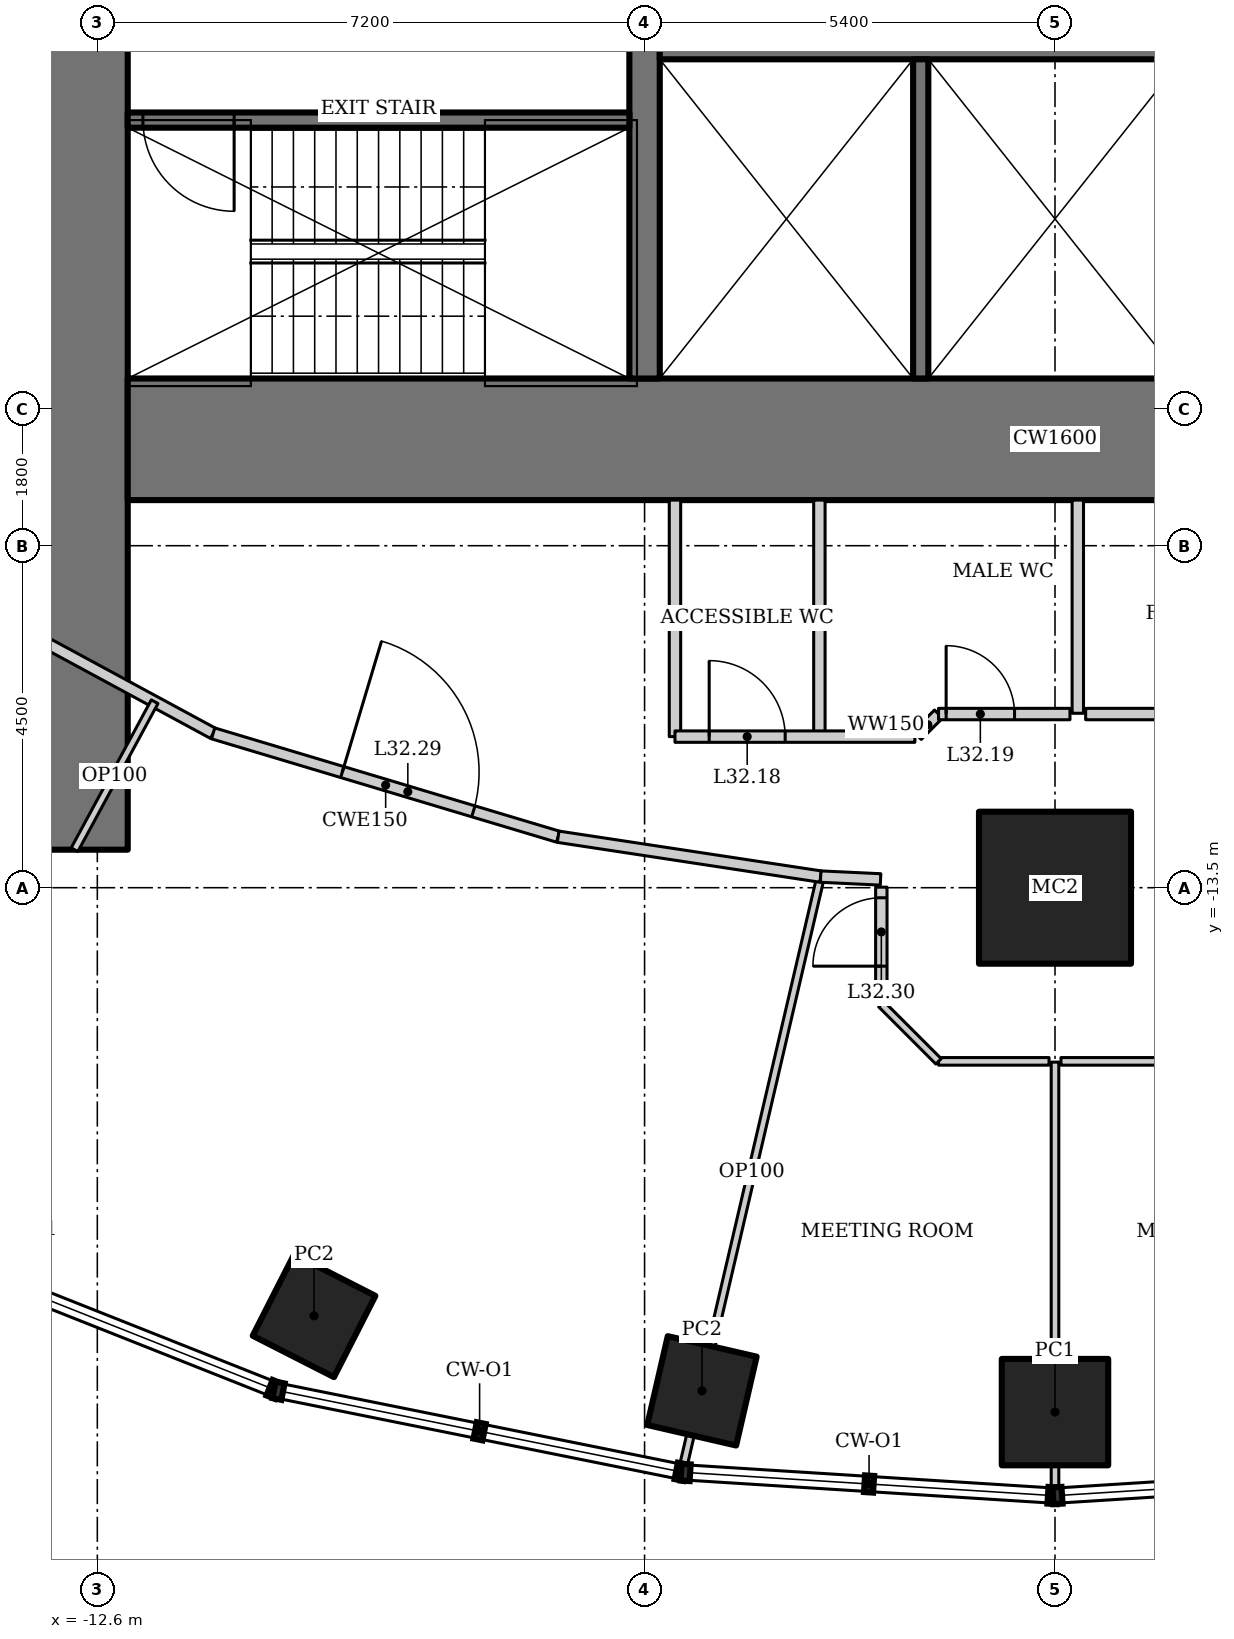
"""IFC4 building model, lengths in metres.
Left out: names, types, materials, properties, quantities, classifications, styles, units other than length and angle.
Written with IfcOpenShell. Run it as: python <this file> out.ifc"""

import sys

from ifc_helpers import new_model, si_unit, direction, frame, frame_2d, origin, origin_2d, place, context, subcontext, project, spatial, rectangle, hollow_rectangle, extrude, element, fill, save


model = new_model("IFC4")
c1 = context("Model", 3, precision=1e-05, world=origin(), true_north=direction((0.0, 1.0)))
c2 = subcontext(c1, "Body", "Model", "MODEL_VIEW")
j1 = project(units=[si_unit("LENGTHUNIT", "METRE"), si_unit("PLANEANGLEUNIT", "RADIAN")], contexts=[c1])
p1 = place(None, origin())
s1 = spatial("IfcSite", under=j1, at=p1, CompositionType="ELEMENT")
p2 = place(p1, origin())
s2 = spatial("IfcBuilding", under=s1, at=p2, CompositionType="ELEMENT")
p3 = place(p2, frame((0.0, 0.0, 138.4)))
s3 = spatial("IfcBuildingStorey", under=s2, at=p3, CompositionType="ELEMENT", Elevation=138.4)
p4 = place(p3, frame((0.0, -13.5, 0.0), z_axis=(0.0, 0.0, 1.0), x_axis=(1.0, 0.0, 0.0)))
e1 = element("IfcColumn", 1, at=p4, inside=s3, PredefinedType="COLUMN", context=c2, shape_type="SweptSolid", body=[
    extrude(hollow_rectangle(XDim=2.0, YDim=2.0, WallThickness=0.17, at=origin_2d()), origin(), (0.0, 0.0, 1.0), 4.2),
])
for number, where, z_axis, x_axis in (
    (2, (-9.749, -19.133, 0.0), (0.0, 0.0, 1.0), (0.454, 0.891, 0.0)),
    (3, (-4.645, -20.12, 0.0), (0.0, 0.0, 1.0), (0.225, 0.974, 0.0)),
):
    element("IfcColumn", number, at=place(p3, frame(where, z_axis=z_axis, x_axis=x_axis)), inside=s3, PredefinedType="COLUMN", context=c2, shape_type="SweptSolid", body=[
        extrude(hollow_rectangle(XDim=1.2, YDim=1.2, WallThickness=0.1, at=origin_2d()), origin(), (0.0, 0.0, 1.0), 4.2),
    ])
p5 = place(p3, frame((0.0, -20.4, 0.0), z_axis=(0.0, 0.0, 1.0), x_axis=(1.0, 0.0, 0.0)))
e4 = element("IfcColumn", 4, at=p5, inside=s3, PredefinedType="COLUMN", context=c2, shape_type="SweptSolid", body=[
    extrude(hollow_rectangle(XDim=1.4, YDim=1.4, WallThickness=0.1, at=origin_2d()), origin(), (0.0, 0.0, 1.0), 4.2),
])
p6 = place(p3, frame((-12.9, 13.0, 0.0), z_axis=(0.0, 0.0, 1.0), x_axis=(0.0, -1.0, 0.0)))
e5 = element("IfcWall", 5, at=p6, inside=s3, PredefinedType="SHEAR", context=c2, shape_type="SweptSolid", body=[
    extrude(rectangle(XDim=26.0, YDim=1.4, at=frame_2d((13.0, 0.0))), origin(), (0.0, 0.0, 1.0), 4.2),
])
p7 = place(p6, frame((12.1, 0.0, 0.0)))
e6 = element("IfcOpeningElement", 6, at=p7, cuts=e5, PredefinedType="OPENING", context=c2, shape_type="SweptSolid", body=[
    extrude(rectangle(XDim=1.8, YDim=2.1, at=frame_2d((0.9, 1.05))), frame((0.0, 0.71, 0.0), z_axis=(0.0, -1.0, 0.0), x_axis=(1.0, 0.0, 0.0)), (0.0, 0.0, 1.0), 1.42),
])
p8 = place(p3, frame((-12.2, -7.6, 0.0), z_axis=(0.0, 0.0, 1.0), x_axis=(1.0, 0.0, 0.0)))
e7 = element("IfcWall", 7, at=p8, inside=s3, PredefinedType="SHEAR", context=c2, shape_type="SweptSolid", body=[
    extrude(rectangle(XDim=24.4, YDim=1.6, at=frame_2d((12.2, 0.0))), origin(), (0.0, 0.0, 1.0), 4.2),
])
p9 = place(p3, frame((-5.4, 6.8, 0.0), z_axis=(0.0, 0.0, 1.0), x_axis=(0.0, -1.0, 0.0)))
e8 = element("IfcWall", 8, at=p9, inside=s3, PredefinedType="SHEAR", context=c2, shape_type="SweptSolid", body=[
    extrude(rectangle(XDim=13.6, YDim=0.4, at=frame_2d((6.8, 0.0))), origin(), (0.0, 0.0, 1.0), 4.2),
])
p10 = place(p9, frame((5.9, 0.0, 0.0)))
e9 = element("IfcOpeningElement", 9, at=p10, cuts=e8, PredefinedType="OPENING", context=c2, shape_type="SweptSolid", body=[
    extrude(rectangle(XDim=1.8, YDim=2.1, at=frame_2d((0.9, 1.05))), frame((0.0, 0.21, 0.0), z_axis=(0.0, -1.0, 0.0), x_axis=(1.0, 0.0, 0.0)), (0.0, 0.0, 1.0), 0.42),
])
p11 = place(p3, frame((-5.2, -2.4, 0.0), z_axis=(0.0, 0.0, 1.0), x_axis=(1.0, 0.0, 0.0)))
e10 = element("IfcWall", 10, at=p11, inside=s3, PredefinedType="SHEAR", context=c2, shape_type="SweptSolid", body=[
    extrude(rectangle(XDim=10.4, YDim=0.4, at=frame_2d((5.2, 0.0))), origin(), (0.0, 0.0, 1.0), 4.2),
])
p12 = place(p3, frame((-1.767, -2.6, 0.0), z_axis=(0.0, 0.0, 1.0), x_axis=(0.0, -1.0, 0.0)))
e11 = element("IfcWall", 11, at=p12, inside=s3, PredefinedType="SOLIDWALL", context=c2, shape_type="SweptSolid", body=[
    extrude(rectangle(XDim=4.2, YDim=0.2, at=frame_2d((2.1, 0.0))), origin(), (0.0, 0.0, 1.0), 4.2),
])
p13 = place(p3, frame((-5.6, -3.4, 0.0), z_axis=(0.0, 0.0, 1.0), x_axis=(-1.0, 0.0, 0.0)))
e12 = element("IfcWall", 12, at=p13, inside=s3, PredefinedType="SHEAR", context=c2, shape_type="SweptSolid", body=[
    extrude(rectangle(XDim=6.6, YDim=0.2, at=frame_2d((3.3, 0.0))), origin(), (0.0, 0.0, 1.0), 4.2),
])
p14 = place(p13, frame((5.2, 0.0, 0.0)))
e13 = element("IfcOpeningElement", 13, at=p14, cuts=e12, PredefinedType="OPENING", context=c2, shape_type="SweptSolid", body=[
    extrude(rectangle(XDim=1.2, YDim=2.1, at=frame_2d((0.6, 1.05))), frame((0.0, 0.11, 0.0), z_axis=(0.0, -1.0, 0.0), x_axis=(1.0, 0.0, 0.0)), (0.0, 0.0, 1.0), 0.22),
])
p15 = place(p3, frame((-4.897, -21.135, 0.0), z_axis=(0.0, 0.0, 1.0), x_axis=(0.227039313577, 0.973885593943, 0.0)))
e14 = element("IfcWall", 14, at=p15, inside=s3, PredefinedType="PARTITIONING", context=c2, shape_type="SweptSolid", body=[
    extrude(rectangle(XDim=7.99, YDim=0.1, at=frame_2d((3.995, 0.0))), origin(), (0.0, 0.0, 1.0), 3.293),
])
p16 = place(p3, frame((-15.696, -8.969, 0.0), z_axis=(0.0, 0.0, 1.0), x_axis=(0.879436285334, -0.476016617397, 0.0)))
e15 = element("IfcWall", 15, at=p16, inside=s3, PredefinedType="PARTITIONING", context=c2, shape_type="SweptSolid", body=[
    extrude(rectangle(XDim=5.253, YDim=0.15, at=frame_2d((2.626, 0.0))), origin(), (0.0, 0.0, 1.0), 4.05),
])
p17 = place(p3, frame((-11.076, -11.469, 0.0), z_axis=(0.0, 0.0, 1.0), x_axis=(0.957933992798, -0.286988615527, 0.0)))
e16 = element("IfcWall", 16, at=p17, inside=s3, PredefinedType="PARTITIONING", context=c2, shape_type="SweptSolid", body=[
    extrude(rectangle(XDim=4.738, YDim=0.15, at=frame_2d((2.369, 0.0))), origin(), (0.0, 0.0, 1.0), 4.05),
])
p18 = place(p17, frame((1.774, 0.0, 0.0)))
e17 = element("IfcOpeningElement", 17, at=p18, cuts=e16, PredefinedType="OPENING", context=c2, shape_type="SweptSolid", body=[
    extrude(rectangle(XDim=1.8, YDim=2.1, at=frame_2d((0.9, 1.05))), frame((0.0, 0.085, 0.0), z_axis=(0.0, -1.0, 0.0), x_axis=(1.0, 0.0, 0.0)), (0.0, 0.0, 1.0), 0.17),
])
p19 = place(p3, frame((-6.537, -12.829, 0.0), z_axis=(0.0, 0.0, 1.0), x_axis=(0.988668719464, -0.150113833987, 0.0)))
e18 = element("IfcWall", 18, at=p19, inside=s3, PredefinedType="PARTITIONING", context=c2, shape_type="SweptSolid", body=[
    extrude(rectangle(XDim=3.493, YDim=0.15, at=frame_2d((1.747, 0.0))), origin(), (0.0, 0.0, 1.0), 4.05),
])
for number, where, z_axis, x_axis in (
    (19, (-5.0, -8.4, 0.0), (0.0, 0.0, 1.0), (0.0, -1.0, 0.0)),
    (20, (-3.1, -8.4, 0.0), (0.0, 0.0, 1.0), (0.0, -1.0, 0.0)),
):
    element("IfcWall", number, at=place(p3, frame(where, z_axis=z_axis, x_axis=x_axis)), inside=s3, PredefinedType="SOLIDWALL", context=c2, shape_type="SweptSolid", body=[
        extrude(rectangle(XDim=3.112, YDim=0.15, at=frame_2d((1.556, 0.0))), origin(), (0.0, 0.0, 1.0), 4.05),
    ])
p20 = place(p3, frame((-12.9, -13.0, 0.0), z_axis=(0.0, 0.0, 1.0), x_axis=(0.475998959765, 0.879445842734, 0.0)))
e21 = element("IfcWall", 21, at=p20, inside=s3, PredefinedType="PARTITIONING", context=c2, shape_type="SweptSolid", body=[
    extrude(rectangle(XDim=2.214, YDim=0.1, at=frame_2d((1.107, 0.0))), origin(), (0.0, 0.0, 1.0), 4.05),
])
p21 = place(p3, frame((0.0, -21.445, 0.0), z_axis=(0.0, 0.0, 1.0), x_axis=(0.0, 1.0, 0.0)))
e22 = element("IfcWall", 22, at=p21, inside=s3, PredefinedType="PARTITIONING", context=c2, shape_type="SweptSolid", body=[
    extrude(rectangle(XDim=5.65, YDim=0.1, at=frame_2d((2.825, 0.0))), origin(), (0.0, 0.0, 1.0), 3.646),
])
p22 = place(p3, frame((-3.083, -13.354, 0.0), z_axis=(0.0, 0.0, 1.0), x_axis=(0.998878614804, -0.04734461836, 0.0)))
e23 = element("IfcWall", 23, at=p22, inside=s3, PredefinedType="PARTITIONING", context=c2, shape_type="SweptSolid", body=[
    extrude(rectangle(XDim=0.789, YDim=0.15, at=frame_2d((0.395, 0.0))), origin(), (0.0, 0.0, 1.0), 4.05),
])
p23 = place(p3, frame((-5.0, -11.512, 0.0), z_axis=(0.0, 0.0, 1.0), x_axis=(1.0, 0.0, 0.0)))
e24 = element("IfcWall", 24, at=p23, inside=s3, PredefinedType="SOLIDWALL", context=c2, shape_type="SweptSolid", body=[
    extrude(rectangle(XDim=3.156, YDim=0.15, at=frame_2d((1.578, 0.0))), origin(), (0.0, 0.0, 1.0), 4.05),
])
p24 = place(p23, frame((0.45, 0.0, 0.0)))
e25 = element("IfcOpeningElement", 25, at=p24, cuts=e24, PredefinedType="OPENING", context=c2, shape_type="SweptSolid", body=[
    extrude(rectangle(XDim=1.0, YDim=2.1, at=frame_2d((0.5, 1.05))), frame((0.0, 0.085, 0.0), z_axis=(0.0, -1.0, 0.0), x_axis=(1.0, 0.0, 0.0)), (0.0, 0.0, 1.0), 0.17),
])
p25 = place(p3, frame((0.3, -8.4, 0.0), z_axis=(0.0, 0.0, 1.0), x_axis=(0.0, -1.0, 0.0)))
e26 = element("IfcWall", 26, at=p25, inside=s3, PredefinedType="SOLIDWALL", context=c2, shape_type="SweptSolid", body=[
    extrude(rectangle(XDim=2.805, YDim=0.15, at=frame_2d((1.403, 0.0))), origin(), (0.0, 0.0, 1.0), 4.05),
])
p26 = place(p3, frame((-1.813, -11.496, 0.0), z_axis=(0.0, 0.0, 1.0), x_axis=(0.707413751745, 0.706799677308, 0.0)))
e27 = element("IfcWall", 27, at=p26, inside=s3, PredefinedType="SOLIDWALL", context=c2, shape_type="SweptSolid", body=[
    extrude(rectangle(XDim=0.397, YDim=0.15, at=frame_2d((0.199, 0.0))), origin(), (0.0, 0.0, 1.0), 4.05),
])
p27 = place(p3, frame((-1.532, -11.215, 0.0), z_axis=(0.0, 0.0, 1.0), x_axis=(1.0, 0.0, 0.0)))
e28 = element("IfcWall", 28, at=p27, inside=s3, PredefinedType="SOLIDWALL", context=c2, shape_type="SweptSolid", body=[
    extrude(rectangle(XDim=1.729, YDim=0.15, at=frame_2d((0.865, 0.0))), origin(), (0.0, 0.0, 1.0), 4.05),
])
p28 = place(p27, frame((0.1, 0.0, 0.0)))
e29 = element("IfcOpeningElement", 29, at=p28, cuts=e28, PredefinedType="OPENING", context=c2, shape_type="SweptSolid", body=[
    extrude(rectangle(XDim=0.9, YDim=2.1, at=frame_2d((0.45, 1.05))), frame((0.0, 0.085, 0.0), z_axis=(0.0, -1.0, 0.0), x_axis=(1.0, 0.0, 0.0)), (0.0, 0.0, 1.0), 0.17),
])
p29 = place(p3, frame((0.403, -11.215, 0.0), z_axis=(0.0, 0.0, 1.0), x_axis=(1.0, 0.0, 0.0)))
e30 = element("IfcWall", 30, at=p29, inside=s3, PredefinedType="SOLIDWALL", context=c2, shape_type="SweptSolid", body=[
    extrude(rectangle(XDim=1.129, YDim=0.15, at=frame_2d((0.564, 0.0))), origin(), (0.0, 0.0, 1.0), 4.05),
])
p30 = place(p3, frame((-2.285, -15.032, 0.0), z_axis=(0.0, 0.0, 1.0), x_axis=(0.0, 1.0, 0.0)))
e31 = element("IfcWall", 31, at=p30, inside=s3, PredefinedType="PARTITIONING", context=c2, shape_type="SweptSolid", body=[
    extrude(rectangle(XDim=1.54, YDim=0.15, at=frame_2d((0.77, 0.0))), origin(), (0.0, 0.0, 1.0), 4.05),
])
p31 = place(p30, frame((0.5, 0.0, 0.0)))
e32 = element("IfcOpeningElement", 32, at=p31, cuts=e31, PredefinedType="OPENING", context=c2, shape_type="SweptSolid", body=[
    extrude(rectangle(XDim=0.9, YDim=2.1, at=frame_2d((0.45, 1.05))), frame((0.0, 0.085, 0.0), z_axis=(0.0, -1.0, 0.0), x_axis=(1.0, 0.0, 0.0)), (0.0, 0.0, 1.0), 0.17),
])
p32 = place(p3, frame((-0.078, -15.785, 0.0), z_axis=(0.0, 0.0, 1.0), x_axis=(-1.0, 0.0, 0.0)))
e33 = element("IfcWall", 33, at=p32, inside=s3, PredefinedType="PARTITIONING", context=c2, shape_type="SweptSolid", body=[
    extrude(rectangle(XDim=1.454, YDim=0.1, at=frame_2d((0.727, 0.0))), origin(), (0.0, 0.0, 1.0), 4.05),
])
p33 = place(p3, frame((-1.532, -15.785, 0.0), z_axis=(0.0, 0.0, 1.0), x_axis=(-0.707106781187, 0.707106781187, 0.0)))
e34 = element("IfcWall", 34, at=p33, inside=s3, PredefinedType="PARTITIONING", context=c2, shape_type="SweptSolid", body=[
    extrude(rectangle(XDim=1.064, YDim=0.1, at=frame_2d((0.532, 0.0))), origin(), (0.0, 0.0, 1.0), 4.05),
])
p34 = place(p3, frame((1.532, -15.785, 0.0), z_axis=(0.0, 0.0, 1.0), x_axis=(-1.0, 0.0, 0.0)))
e35 = element("IfcWall", 35, at=p34, inside=s3, PredefinedType="PARTITIONING", context=c2, shape_type="SweptSolid", body=[
    extrude(rectangle(XDim=1.454, YDim=0.1, at=frame_2d((0.727, 0.0))), origin(), (0.0, 0.0, 1.0), 4.05),
])
p35 = place(p14, origin())
e36 = element("IfcDoor", 36, at=p35, inside=s3, OperationType="SINGLE_SWING_RIGHT", PredefinedType="DOOR", context=c2, shape_type="SweptSolid", body=[
    extrude(rectangle(XDim=1.2, YDim=2.1, at=frame_2d((0.6, 1.05))), frame((0.0, 0.025, 0.0), z_axis=(0.0, -1.0, 0.0), x_axis=(1.0, 0.0, 0.0)), (0.0, 0.0, 1.0), 0.05),
])
fill(e13, e36)
p36 = place(p24, origin())
e37 = element("IfcDoor", 37, at=p36, inside=s3, OperationType="SINGLE_SWING_LEFT", PredefinedType="DOOR", context=c2, shape_type="SweptSolid", body=[
    extrude(rectangle(XDim=1.0, YDim=2.1, at=frame_2d((0.5, 1.05))), frame((0.0, 0.025, 0.0), z_axis=(0.0, -1.0, 0.0), x_axis=(1.0, 0.0, 0.0)), (0.0, 0.0, 1.0), 0.05),
])
fill(e25, e37)
p37 = place(p28, origin())
e38 = element("IfcDoor", 38, at=p37, inside=s3, OperationType="SINGLE_SWING_LEFT", PredefinedType="DOOR", context=c2, shape_type="SweptSolid", body=[
    extrude(rectangle(XDim=0.9, YDim=2.1, at=frame_2d((0.45, 1.05))), frame((0.0, 0.025, 0.0), z_axis=(0.0, -1.0, 0.0), x_axis=(1.0, 0.0, 0.0)), (0.0, 0.0, 1.0), 0.05),
])
fill(e29, e38)
p38 = place(p18, origin())
e39 = element("IfcDoor", 39, at=p38, inside=s3, OperationType="DOUBLE_DOOR_DOUBLE_SWING", PredefinedType="DOOR", context=c2, shape_type="SweptSolid", body=[
    extrude(rectangle(XDim=1.8, YDim=2.1, at=frame_2d((0.9, 1.05))), frame((0.0, 0.025, 0.0), z_axis=(0.0, -1.0, 0.0), x_axis=(1.0, 0.0, 0.0)), (0.0, 0.0, 1.0), 0.05),
])
fill(e17, e39)
p39 = place(p31, origin())
e40 = element("IfcDoor", 40, at=p39, inside=s3, OperationType="SINGLE_SWING_LEFT", PredefinedType="DOOR", context=c2, shape_type="SweptSolid", body=[
    extrude(rectangle(XDim=0.9, YDim=2.1, at=frame_2d((0.45, 1.05))), frame((0.0, 0.025, 0.0), z_axis=(0.0, -1.0, 0.0), x_axis=(1.0, 0.0, 0.0)), (0.0, 0.0, 1.0), 0.05),
])
fill(e32, e40)
save(model, sys.argv[1])
